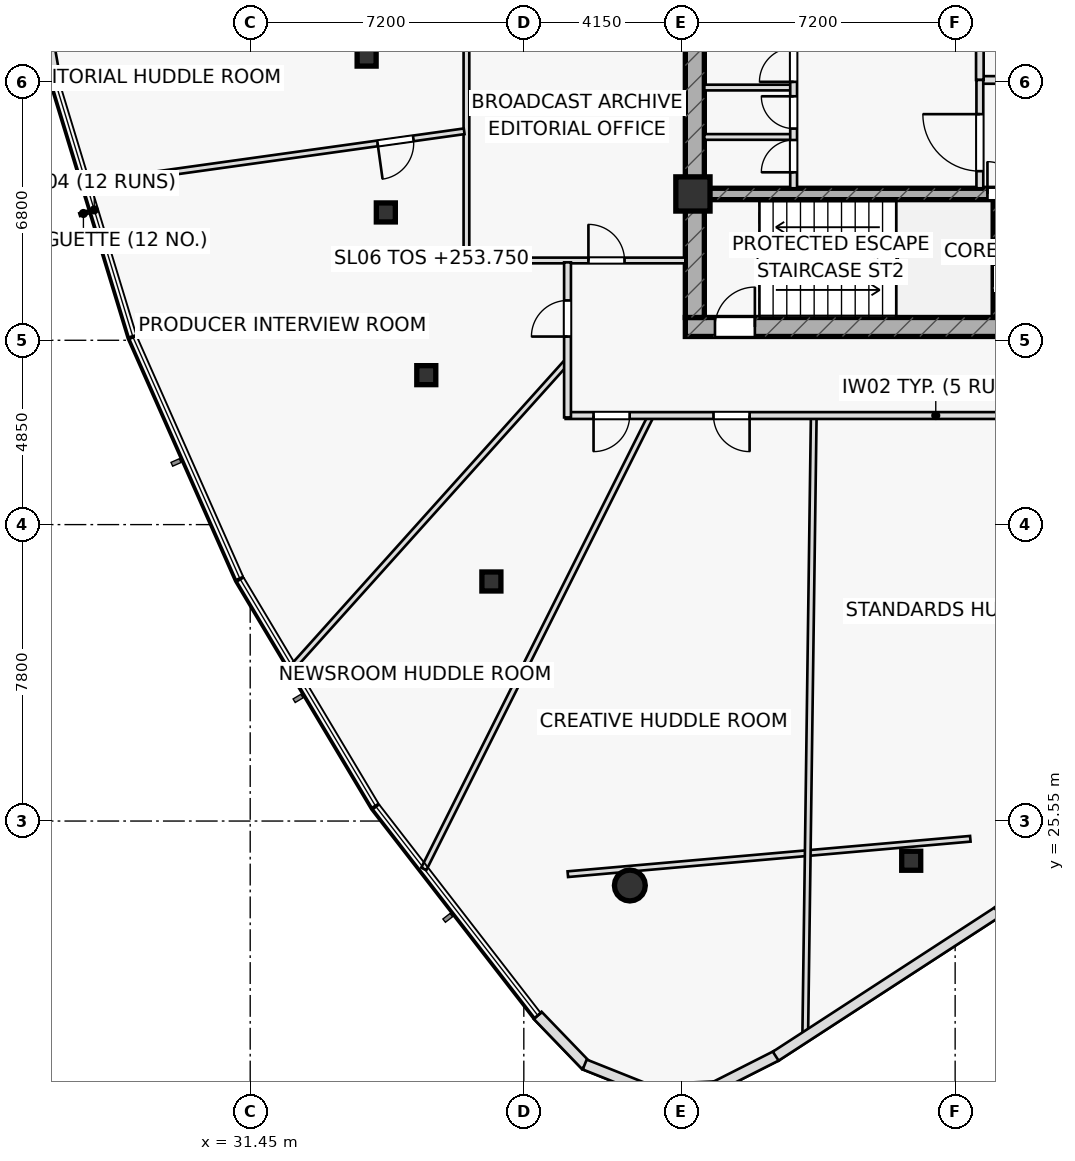
"""IFC4 building model, lengths in metres.
Left out: names, types, materials, properties, quantities, classifications, styles, units other than length and angle.
Written with IfcOpenShell. Run it as: python <this file> out.ifc"""

import sys

from ifc_helpers import new_model, si_unit, direction, frame, frame_2d, origin, origin_2d, place, context, subcontext, project, spatial, rectangle, hollow_rectangle, hollow_circle, extrude, element, fill, save


model = new_model("IFC4")
c1 = context("Model", 3, precision=1e-05, world=origin(), true_north=direction((0.0, 1.0)))
c2 = subcontext(c1, "Body", "Model", "MODEL_VIEW")
j1 = project(units=[si_unit("LENGTHUNIT", "METRE"), si_unit("PLANEANGLEUNIT", "RADIAN")], contexts=[c1])
p1 = place(None, origin())
s1 = spatial("IfcSite", under=j1, at=p1, CompositionType="ELEMENT")
p2 = place(p1, origin())
s2 = spatial("IfcBuilding", under=s1, at=p2, CompositionType="ELEMENT")
p3 = place(p2, frame((0.0, 0.0, 253.75)))
s3 = spatial("IfcBuildingStorey", under=s2, at=p3, CompositionType="ELEMENT", Elevation=253.75)
p4 = place(p3, frame((51.11, 38.8, 0.0), z_axis=(0.0, 0.0, 1.0), x_axis=(0.0, 1.0, 0.0)))
e1 = element("IfcWall", 1, at=p4, inside=s3, PredefinedType="SHEAR", context=c2, shape_type="SweptSolid", body=[
    extrude(rectangle(XDim=3.1, YDim=0.22, at=frame_2d((1.55, 0.0))), origin(), (0.0, 0.0, 1.0), 3.65),
])
p5 = place(p3, frame((42.9, 38.55, 0.0), z_axis=(0.0, 0.0, 1.0), x_axis=(1.0, 0.0, 0.0)))
e2 = element("IfcWall", 2, at=p5, inside=s3, PredefinedType="SHEAR", context=c2, shape_type="SweptSolid", body=[
    extrude(rectangle(XDim=14.2, YDim=0.5, at=frame_2d((7.1, 0.0))), origin(), (0.0, 0.0, 1.0), 3.65),
])
p6 = place(p5, frame((0.78, 0.0, 0.0)))
e3 = element("IfcOpeningElement", 3, at=p6, cuts=e2, PredefinedType="OPENING", context=c2, shape_type="SweptSolid", body=[
    extrude(rectangle(XDim=1.05, YDim=2.2, at=frame_2d((0.525, 1.1))), frame((0.0, 0.26, 0.0), z_axis=(0.0, -1.0, 0.0), x_axis=(1.0, 0.0, 0.0)), (0.0, 0.0, 1.0), 0.52),
])
p7 = place(p3, frame((43.15, 38.8, 0.0), z_axis=(0.0, 0.0, 1.0), x_axis=(0.0, 1.0, 0.0)))
e4 = element("IfcWall", 4, at=p7, inside=s3, PredefinedType="SHEAR", context=c2, shape_type="SweptSolid", body=[
    extrude(rectangle(XDim=12.4, YDim=0.5, at=frame_2d((6.2, 0.0))), origin(), (0.0, 0.0, 1.0), 3.65),
])
p8 = place(p3, frame((43.4, 42.05, 0.0), z_axis=(0.0, 0.0, 1.0), x_axis=(1.0, 0.0, 0.0)))
e5 = element("IfcWall", 5, at=p8, inside=s3, PredefinedType="SHEAR", context=c2, shape_type="SweptSolid", body=[
    extrude(rectangle(XDim=13.2, YDim=0.3, at=frame_2d((6.6, 0.0))), origin(), (0.0, 0.0, 1.0), 3.65),
])
p9 = place(p8, frame((7.45, 0.0, 0.0)))
e6 = element("IfcOpeningElement", 6, at=p9, cuts=e5, PredefinedType="OPENING", context=c2, shape_type="SweptSolid", body=[
    extrude(rectangle(XDim=0.85, YDim=2.05, at=frame_2d((0.425, 1.025))), frame((0.0, 0.16, 0.0), z_axis=(0.0, -1.0, 0.0), x_axis=(1.0, 0.0, 0.0)), (0.0, 0.0, 1.0), 0.32),
])
p10 = place(p8, frame((9.5, 0.0, 0.0)))
e7 = element("IfcOpeningElement", 7, at=p10, cuts=e5, PredefinedType="OPENING", context=c2, shape_type="SweptSolid", body=[
    extrude(rectangle(XDim=0.85, YDim=2.05, at=frame_2d((0.425, 1.025))), frame((0.0, 0.16, 0.0), z_axis=(0.0, -1.0, 0.0), x_axis=(1.0, 0.0, 0.0)), (0.0, 0.0, 1.0), 0.32),
])
p11 = place(p8, frame((11.6, 0.0, 0.0)))
e8 = element("IfcOpeningElement", 8, at=p11, cuts=e5, PredefinedType="OPENING", context=c2, shape_type="SweptSolid", body=[
    extrude(rectangle(XDim=0.85, YDim=2.05, at=frame_2d((0.425, 1.025))), frame((0.0, 0.16, 0.0), z_axis=(0.0, -1.0, 0.0), x_axis=(1.0, 0.0, 0.0)), (0.0, 0.0, 1.0), 0.32),
])
p12 = place(p3, frame((43.1, 42.05, 0.0), z_axis=(0.0, 0.0, 1.0), x_axis=(1.0, 0.0, 0.0)))
e9 = element("IfcColumn", 9, at=p12, inside=s3, PredefinedType="COLUMN", context=c2, shape_type="SweptSolid", body=[
    extrude(rectangle(XDim=0.9, YDim=0.9, at=origin_2d()), origin(), (0.0, 0.0, 1.0), 3.65),
])
for number, where, z_axis, x_axis in (
    (10, (34.514, 45.665, 0.0), (0.0, 0.0, 1.0), (1.0, 0.0, 0.0)),
    (11, (35.019, 41.564, 0.0), (0.0, 0.0, 1.0), (1.0, 0.0, 0.0)),
    (12, (36.083, 37.282, 0.0), (0.0, 0.0, 1.0), (1.0, 0.0, 0.0)),
    (13, (37.797, 31.853, 0.0), (0.0, 0.0, 1.0), (1.0, 0.0, 0.0)),
):
    element("IfcColumn", number, at=place(p3, frame(where, z_axis=z_axis, x_axis=x_axis)), inside=s3, PredefinedType="COLUMN", context=c2, shape_type="SweptSolid", body=[
        extrude(hollow_rectangle(XDim=0.5, YDim=0.5, WallThickness=0.03, at=origin_2d()), origin(), (0.0, 0.0, 1.0), 3.65),
    ])
p13 = place(p3, frame((41.44, 23.854, 0.0), z_axis=(0.0, 0.0, 1.0), x_axis=(1.0, 0.0, 0.0)))
e14 = element("IfcColumn", 14, at=p13, inside=s3, PredefinedType="COLUMN", context=c2, shape_type="SweptSolid", body=[
    extrude(hollow_circle(Radius=0.406, WallThickness=0.036, at=origin_2d()), origin(), (0.0, 0.0, 1.0), 3.65),
])
p14 = place(p3, frame((48.844, 24.505, 0.0), z_axis=(0.0, 0.0, 1.0), x_axis=(1.0, 0.0, 0.0)))
e15 = element("IfcColumn", 15, at=p14, inside=s3, PredefinedType="COLUMN", context=c2, shape_type="SweptSolid", body=[
    extrude(hollow_rectangle(XDim=0.5, YDim=0.5, WallThickness=0.03, at=origin_2d()), origin(), (0.0, 0.0, 1.0), 3.65),
])
p15 = place(p3, frame((50.65, 45.05, 0.0), z_axis=(0.0, 0.0, 1.0), x_axis=(1.0, 0.0, 0.0)))
e16 = element("IfcWall", 16, at=p15, inside=s3, PredefinedType="PARTITIONING", context=c2, shape_type="SweptSolid", body=[
    extrude(rectangle(XDim=5.95, YDim=0.2, at=frame_2d((2.975, 0.0))), origin(), (0.0, 0.0, 1.0), 3.65),
])
p16 = place(p15, frame((1.35, 0.0, 0.0)))
e17 = element("IfcOpeningElement", 17, at=p16, cuts=e16, PredefinedType="OPENING", context=c2, shape_type="SweptSolid", body=[
    extrude(rectangle(XDim=1.5, YDim=2.2, at=frame_2d((0.75, 1.1))), frame((0.0, 0.11, 0.0), z_axis=(0.0, -1.0, 0.0), x_axis=(1.0, 0.0, 0.0)), (0.0, 0.0, 1.0), 0.22),
])
p17 = place(p3, frame((50.65, 45.05, 0.0), z_axis=(0.0, 0.0, 1.0), x_axis=(0.0, 1.0, 0.0)))
e18 = element("IfcWall", 18, at=p17, inside=s3, PredefinedType="PARTITIONING", context=c2, shape_type="SweptSolid", body=[
    extrude(rectangle(XDim=2.75, YDim=0.2, at=frame_2d((1.375, 0.0))), origin(), (0.0, 0.0, 1.0), 3.65),
])
p18 = place(p3, frame((50.65, 42.2, 0.0), z_axis=(0.0, 0.0, 1.0), x_axis=(0.0, 1.0, 0.0)))
e19 = element("IfcWall", 19, at=p18, inside=s3, PredefinedType="PARTITIONING", context=c2, shape_type="SweptSolid", body=[
    extrude(rectangle(XDim=2.85, YDim=0.18, at=frame_2d((1.425, 0.0))), origin(), (0.0, 0.0, 1.0), 3.65),
])
p19 = place(p18, frame((0.45, 0.0, 0.0)))
e20 = element("IfcOpeningElement", 20, at=p19, cuts=e19, PredefinedType="OPENING", context=c2, shape_type="SweptSolid", body=[
    extrude(rectangle(XDim=1.5, YDim=2.2, at=frame_2d((0.75, 1.1))), frame((0.0, 0.1, 0.0), z_axis=(0.0, -1.0, 0.0), x_axis=(1.0, 0.0, 0.0)), (0.0, 0.0, 1.0), 0.2),
])
for number, where, z_axis, x_axis in (
    (21, (43.4, 43.55, 0.0), (0.0, 0.0, 1.0), (1.0, 0.0, 0.0)),
    (22, (43.4, 44.85, 0.0), (0.0, 0.0, 1.0), (1.0, 0.0, 0.0)),
):
    element("IfcWall", number, at=place(p3, frame(where, z_axis=z_axis, x_axis=x_axis)), inside=s3, PredefinedType="PARTITIONING", context=c2, shape_type="SweptSolid", body=[
        extrude(rectangle(XDim=2.35, YDim=0.15, at=frame_2d((1.175, 0.0))), origin(), (0.0, 0.0, 1.0), 3.65),
    ])
p20 = place(p3, frame((45.75, 42.2, 0.0), z_axis=(0.0, 0.0, 1.0), x_axis=(0.0, 1.0, 0.0)))
e23 = element("IfcWall", 23, at=p20, inside=s3, PredefinedType="PARTITIONING", context=c2, shape_type="SweptSolid", body=[
    extrude(rectangle(XDim=5.6, YDim=0.18, at=frame_2d((2.8, 0.0))), origin(), (0.0, 0.0, 1.0), 3.65),
])
p21 = place(p20, frame((0.42, 0.0, 0.0)))
e24 = element("IfcOpeningElement", 24, at=p21, cuts=e23, PredefinedType="OPENING", context=c2, shape_type="SweptSolid", body=[
    extrude(rectangle(XDim=0.85, YDim=2.05, at=frame_2d((0.425, 1.025))), frame((0.0, 0.1, 0.0), z_axis=(0.0, -1.0, 0.0), x_axis=(1.0, 0.0, 0.0)), (0.0, 0.0, 1.0), 0.2),
])
p22 = place(p20, frame((1.57, 0.0, 0.0)))
e25 = element("IfcOpeningElement", 25, at=p22, cuts=e23, PredefinedType="OPENING", context=c2, shape_type="SweptSolid", body=[
    extrude(rectangle(XDim=0.85, YDim=2.05, at=frame_2d((0.425, 1.025))), frame((0.0, 0.1, 0.0), z_axis=(0.0, -1.0, 0.0), x_axis=(1.0, 0.0, 0.0)), (0.0, 0.0, 1.0), 0.2),
])
p23 = place(p20, frame((2.8, 0.0, 0.0)))
e26 = element("IfcOpeningElement", 26, at=p23, cuts=e23, PredefinedType="OPENING", context=c2, shape_type="SweptSolid", body=[
    extrude(rectangle(XDim=0.9, YDim=2.05, at=frame_2d((0.45, 1.025))), frame((0.0, 0.1, 0.0), z_axis=(0.0, -1.0, 0.0), x_axis=(1.0, 0.0, 0.0)), (0.0, 0.0, 1.0), 0.2),
])
p24 = place(p3, frame((39.808, 24.152, 0.0), z_axis=(0.0, 0.0, 1.0), x_axis=(0.996153584085, 0.087624408208, 0.0)))
e27 = element("IfcWall", 27, at=p24, inside=s3, PredefinedType="PARTITIONING", context=c2, shape_type="SweptSolid", body=[
    extrude(rectangle(XDim=10.632, YDim=0.15, at=frame_2d((5.316, 0.0))), origin(), (0.0, 0.0, 1.0), 3.175),
])
p25 = place(p3, frame((37.14, 40.3, 0.0), z_axis=(0.0, 0.0, 1.0), x_axis=(1.0, 0.0, 0.0)))
e28 = element("IfcWall", 28, at=p25, inside=s3, PredefinedType="PARTITIONING", context=c2, shape_type="SweptSolid", body=[
    extrude(rectangle(XDim=5.76, YDim=0.15, at=frame_2d((2.88, 0.0))), origin(), (0.0, 0.0, 1.0), 3.075),
])
p26 = place(p25, frame((3.21, 0.0, 0.0)))
e29 = element("IfcOpeningElement", 29, at=p26, cuts=e28, PredefinedType="OPENING", context=c2, shape_type="SweptSolid", body=[
    extrude(rectangle(XDim=0.95, YDim=2.05, at=frame_2d((0.475, 1.025))), frame((0.0, 0.085, 0.0), z_axis=(0.0, -1.0, 0.0), x_axis=(1.0, 0.0, 0.0)), (0.0, 0.0, 1.0), 0.17),
])
p27 = place(p3, frame((37.14, 40.3, 0.0), z_axis=(0.0, 0.0, 1.0), x_axis=(0.0, 1.0, 0.0)))
e30 = element("IfcWall", 30, at=p27, inside=s3, PredefinedType="PARTITIONING", context=c2, shape_type="SweptSolid", body=[
    extrude(rectangle(XDim=7.58, YDim=0.15, at=frame_2d((3.79, 0.0))), origin(), (0.0, 0.0, 1.0), 3.65),
])
p28 = place(p3, frame((37.08, 43.699, 0.0), z_axis=(0.0, 0.0, 1.0), x_axis=(-0.990392593829, -0.13828416427, 0.0)))
e31 = element("IfcWall", 31, at=p28, inside=s3, PredefinedType="PARTITIONING", context=c2, shape_type="SweptSolid", body=[
    extrude(rectangle(XDim=10.047, YDim=0.15, at=frame_2d((5.024, 0.0))), origin(), (0.0, 0.0, 1.0), 3.175),
])
p29 = place(p28, frame((1.35, 0.0, 0.0)))
e32 = element("IfcOpeningElement", 32, at=p29, cuts=e31, PredefinedType="OPENING", context=c2, shape_type="SweptSolid", body=[
    extrude(rectangle(XDim=0.95, YDim=2.05, at=frame_2d((0.475, 1.025))), frame((0.0, 0.085, 0.0), z_axis=(0.0, -1.0, 0.0), x_axis=(1.0, 0.0, 0.0)), (0.0, 0.0, 1.0), 0.17),
])
p30 = place(p3, frame((39.8, 37.653, 0.0), z_axis=(0.0, 0.0, 1.0), x_axis=(-0.668272256162, -0.743916790806, 0.0)))
e33 = element("IfcWall", 33, at=p30, inside=s3, PredefinedType="PARTITIONING", context=c2, shape_type="SweptSolid", body=[
    extrude(rectangle(XDim=10.835, YDim=0.15, at=frame_2d((5.417, 0.0))), origin(), (0.0, 0.0, 1.0), 3.175),
])
p31 = place(p3, frame((41.998, 36.22, 0.0), z_axis=(0.0, 0.0, 1.0), x_axis=(-0.448164626772, -0.893951043017, 0.0)))
e34 = element("IfcWall", 34, at=p31, inside=s3, PredefinedType="PARTITIONING", context=c2, shape_type="SweptSolid", body=[
    extrude(rectangle(XDim=13.345, YDim=0.15, at=frame_2d((6.673, 0.0))), origin(), (0.0, 0.0, 1.0), 3.175),
])
p32 = place(p3, frame((46.279, 36.22, 0.0), z_axis=(0.0, 0.0, 1.0), x_axis=(-0.013739844255, -0.999905603885, 0.0)))
e35 = element("IfcWall", 35, at=p32, inside=s3, PredefinedType="PARTITIONING", context=c2, shape_type="SweptSolid", body=[
    extrude(rectangle(XDim=16.365, YDim=0.15, at=frame_2d((8.183, 0.0))), origin(), (0.0, 0.0, 1.0), 3.075),
])
p33 = place(p3, frame((59.23, 36.22, 0.0), z_axis=(0.0, 0.0, 1.0), x_axis=(-1.0, 0.0, 0.0)))
e36 = element("IfcWall", 36, at=p33, inside=s3, PredefinedType="PARTITIONING", context=c2, shape_type="SweptSolid", body=[
    extrude(rectangle(XDim=19.48, YDim=0.18, at=frame_2d((9.74, 0.0))), origin(), (0.0, 0.0, 1.0), 3.075),
])
p34 = place(p33, frame((6.119, 0.0, 0.0)))
e37 = element("IfcOpeningElement", 37, at=p34, cuts=e36, PredefinedType="OPENING", context=c2, shape_type="SweptSolid", body=[
    extrude(rectangle(XDim=0.95, YDim=2.05, at=frame_2d((0.475, 1.025))), frame((0.0, 0.1, 0.0), z_axis=(0.0, -1.0, 0.0), x_axis=(1.0, 0.0, 0.0)), (0.0, 0.0, 1.0), 0.2),
])
p35 = place(p33, frame((14.639, 0.0, 0.0)))
e38 = element("IfcOpeningElement", 38, at=p35, cuts=e36, PredefinedType="OPENING", context=c2, shape_type="SweptSolid", body=[
    extrude(rectangle(XDim=0.95, YDim=2.05, at=frame_2d((0.475, 1.025))), frame((0.0, 0.1, 0.0), z_axis=(0.0, -1.0, 0.0), x_axis=(1.0, 0.0, 0.0)), (0.0, 0.0, 1.0), 0.2),
])
p36 = place(p33, frame((17.795, 0.0, 0.0)))
e39 = element("IfcOpeningElement", 39, at=p36, cuts=e36, PredefinedType="OPENING", context=c2, shape_type="SweptSolid", body=[
    extrude(rectangle(XDim=0.95, YDim=2.05, at=frame_2d((0.475, 1.025))), frame((0.0, 0.1, 0.0), z_axis=(0.0, -1.0, 0.0), x_axis=(1.0, 0.0, 0.0)), (0.0, 0.0, 1.0), 0.2),
])
p37 = place(p3, frame((39.8, 36.17, 0.0), z_axis=(0.0, 0.0, 1.0), x_axis=(0.0, 1.0, 0.0)))
e40 = element("IfcWall", 40, at=p37, inside=s3, PredefinedType="PARTITIONING", context=c2, shape_type="SweptSolid", body=[
    extrude(rectangle(XDim=4.08, YDim=0.18, at=frame_2d((2.04, 0.0))), origin(), (0.0, 0.0, 1.0), 3.355),
])
p38 = place(p37, frame((2.128, 0.0, 0.0)))
e41 = element("IfcOpeningElement", 41, at=p38, cuts=e40, PredefinedType="OPENING", context=c2, shape_type="SweptSolid", body=[
    extrude(rectangle(XDim=0.95, YDim=2.05, at=frame_2d((0.475, 1.025))), frame((0.0, 0.1, 0.0), z_axis=(0.0, -1.0, 0.0), x_axis=(1.0, 0.0, 0.0)), (0.0, 0.0, 1.0), 0.2),
])
p39 = place(p3, frame((25.125, 51.832, 0.0), z_axis=(0.0, 0.0, 1.0), x_axis=(0.173183155721, -0.984889635733, 0.0)))
e42 = element("IfcWall", 42, at=p39, inside=s3, PredefinedType="STANDARD", context=c2, shape_type="SweptSolid", body=[
    extrude(rectangle(XDim=6.985, YDim=0.28, at=frame_2d((3.493, 0.0))), origin(), (0.0, 0.0, 1.0), 3.65),
])
p40 = place(p3, frame((39.017, 20.435, 0.0), z_axis=(0.0, 0.0, 1.0), x_axis=(0.694083323377, -0.719894672997, 0.0)))
e43 = element("IfcWall", 43, at=p40, inside=s3, PredefinedType="STANDARD", context=c2, shape_type="SweptSolid", body=[
    extrude(rectangle(XDim=1.816, YDim=0.28, at=frame_2d((0.908, 0.0))), origin(), (0.0, 0.0, 1.0), 3.65),
])
for number, where, z_axis, x_axis in (
    (44, (40.253, 19.144, 0.0), (0.0, 0.0, 1.0), (0.929, -0.371, 0.0)),
    (45, (41.9, 18.48, 0.0), (0.0, 0.0, 1.0), (0.999, 0.045, 0.0)),
):
    element("IfcWall", number, at=place(p3, frame(where, z_axis=z_axis, x_axis=x_axis)), inside=s3, PredefinedType="STANDARD", context=c2, shape_type="SweptSolid", body=[
        extrude(rectangle(XDim=1.804, YDim=0.28, at=frame_2d((0.902, 0.0))), origin(), (0.0, 0.0, 1.0), 3.65),
    ])
p41 = place(p3, frame((43.674, 18.553, 0.0), z_axis=(0.0, 0.0, 1.0), x_axis=(0.892170792594, 0.451698214345, 0.0)))
e46 = element("IfcWall", 46, at=p41, inside=s3, PredefinedType="STANDARD", context=c2, shape_type="SweptSolid", body=[
    extrude(rectangle(XDim=1.827, YDim=0.28, at=frame_2d((0.914, 0.0))), origin(), (0.0, 0.0, 1.0), 3.65),
])
p42 = place(p3, frame((45.278, 19.364, 0.0), z_axis=(0.0, 0.0, 1.0), x_axis=(0.838435644582, 0.545000614581, 0.0)))
e47 = element("IfcWall", 47, at=p42, inside=s3, PredefinedType="STANDARD", context=c2, shape_type="SweptSolid", body=[
    extrude(rectangle(XDim=6.997, YDim=0.28, at=frame_2d((3.499, 0.0))), origin(), (0.0, 0.0, 1.0), 3.65),
])
p43 = place(p3, frame((51.121, 23.159, 0.0), z_axis=(0.0, 0.0, 1.0), x_axis=(0.766321422368, 0.642457374166, 0.0)))
e48 = element("IfcWall", 48, at=p43, inside=s3, PredefinedType="STANDARD", context=c2, shape_type="SweptSolid", body=[
    extrude(rectangle(XDim=6.985, YDim=0.28, at=frame_2d((3.493, 0.0))), origin(), (0.0, 0.0, 1.0), 3.65),
])
p44 = place(p6, origin())
e49 = element("IfcDoor", 49, at=p44, inside=s3, OperationType="SINGLE_SWING_RIGHT", PredefinedType="DOOR", context=c2, shape_type="SweptSolid", body=[
    extrude(rectangle(XDim=1.05, YDim=2.2, at=frame_2d((0.525, 1.1))), frame((0.0, 0.025, 0.0), z_axis=(0.0, -1.0, 0.0), x_axis=(1.0, 0.0, 0.0)), (0.0, 0.0, 1.0), 0.05),
])
fill(e3, e49)
p45 = place(p19, origin())
e50 = element("IfcDoor", 50, at=p45, inside=s3, OperationType="SINGLE_SWING_RIGHT", PredefinedType="DOOR", context=c2, shape_type="SweptSolid", body=[
    extrude(rectangle(XDim=1.5, YDim=2.2, at=frame_2d((0.75, 1.1))), frame((0.0, 0.025, 0.0), z_axis=(0.0, -1.0, 0.0), x_axis=(1.0, 0.0, 0.0)), (0.0, 0.0, 1.0), 0.05),
])
fill(e20, e50)
p46 = place(p9, origin())
e51 = element("IfcDoor", 51, at=p46, inside=s3, OperationType="SINGLE_SWING_LEFT", PredefinedType="DOOR", context=c2, shape_type="SweptSolid", body=[
    extrude(rectangle(XDim=0.85, YDim=2.05, at=frame_2d((0.425, 1.025))), frame((0.0, 0.025, 0.0), z_axis=(0.0, -1.0, 0.0), x_axis=(1.0, 0.0, 0.0)), (0.0, 0.0, 1.0), 0.05),
])
fill(e6, e51)
p47 = place(p21, origin())
e52 = element("IfcDoor", 52, at=p47, inside=s3, OperationType="SINGLE_SWING_LEFT", PredefinedType="DOOR", context=c2, shape_type="SweptSolid", body=[
    extrude(rectangle(XDim=0.85, YDim=2.05, at=frame_2d((0.425, 1.025))), frame((0.0, 0.025, 0.0), z_axis=(0.0, -1.0, 0.0), x_axis=(1.0, 0.0, 0.0)), (0.0, 0.0, 1.0), 0.05),
])
fill(e24, e52)
p48 = place(p22, origin())
e53 = element("IfcDoor", 53, at=p48, inside=s3, OperationType="SINGLE_SWING_RIGHT", PredefinedType="DOOR", context=c2, shape_type="SweptSolid", body=[
    extrude(rectangle(XDim=0.85, YDim=2.05, at=frame_2d((0.425, 1.025))), frame((0.0, 0.025, 0.0), z_axis=(0.0, -1.0, 0.0), x_axis=(1.0, 0.0, 0.0)), (0.0, 0.0, 1.0), 0.05),
])
fill(e25, e53)
p49 = place(p23, origin())
e54 = element("IfcDoor", 54, at=p49, inside=s3, OperationType="SINGLE_SWING_LEFT", PredefinedType="DOOR", context=c2, shape_type="SweptSolid", body=[
    extrude(rectangle(XDim=0.9, YDim=2.05, at=frame_2d((0.45, 1.025))), frame((0.0, 0.025, 0.0), z_axis=(0.0, -1.0, 0.0), x_axis=(1.0, 0.0, 0.0)), (0.0, 0.0, 1.0), 0.05),
])
fill(e26, e54)
p50 = place(p26, origin())
e55 = element("IfcDoor", 55, at=p50, inside=s3, OperationType="SINGLE_SWING_LEFT", PredefinedType="DOOR", context=c2, shape_type="SweptSolid", body=[
    extrude(rectangle(XDim=0.95, YDim=2.05, at=frame_2d((0.475, 1.025))), frame((0.0, 0.025, 0.0), z_axis=(0.0, -1.0, 0.0), x_axis=(1.0, 0.0, 0.0)), (0.0, 0.0, 1.0), 0.05),
])
fill(e29, e55)
p51 = place(p29, origin())
e56 = element("IfcDoor", 56, at=p51, inside=s3, OperationType="SINGLE_SWING_RIGHT", PredefinedType="DOOR", context=c2, shape_type="SweptSolid", body=[
    extrude(rectangle(XDim=0.95, YDim=2.05, at=frame_2d((0.475, 1.025))), frame((0.0, 0.025, 0.0), z_axis=(0.0, -1.0, 0.0), x_axis=(1.0, 0.0, 0.0)), (0.0, 0.0, 1.0), 0.05),
])
fill(e32, e56)
p52 = place(p35, origin())
e57 = element("IfcDoor", 57, at=p52, inside=s3, OperationType="SINGLE_SWING_LEFT", PredefinedType="DOOR", context=c2, shape_type="SweptSolid", body=[
    extrude(rectangle(XDim=0.95, YDim=2.05, at=frame_2d((0.475, 1.025))), frame((0.0, 0.025, 0.0), z_axis=(0.0, -1.0, 0.0), x_axis=(1.0, 0.0, 0.0)), (0.0, 0.0, 1.0), 0.05),
])
fill(e38, e57)
p53 = place(p36, origin())
e58 = element("IfcDoor", 58, at=p53, inside=s3, OperationType="SINGLE_SWING_RIGHT", PredefinedType="DOOR", context=c2, shape_type="SweptSolid", body=[
    extrude(rectangle(XDim=0.95, YDim=2.05, at=frame_2d((0.475, 1.025))), frame((0.0, 0.025, 0.0), z_axis=(0.0, -1.0, 0.0), x_axis=(1.0, 0.0, 0.0)), (0.0, 0.0, 1.0), 0.05),
])
fill(e39, e58)
p54 = place(p38, origin())
e59 = element("IfcDoor", 59, at=p54, inside=s3, OperationType="SINGLE_SWING_LEFT", PredefinedType="DOOR", context=c2, shape_type="SweptSolid", body=[
    extrude(rectangle(XDim=0.95, YDim=2.05, at=frame_2d((0.475, 1.025))), frame((0.0, 0.025, 0.0), z_axis=(0.0, -1.0, 0.0), x_axis=(1.0, 0.0, 0.0)), (0.0, 0.0, 1.0), 0.05),
])
fill(e41, e59)
save(model, sys.argv[1])
